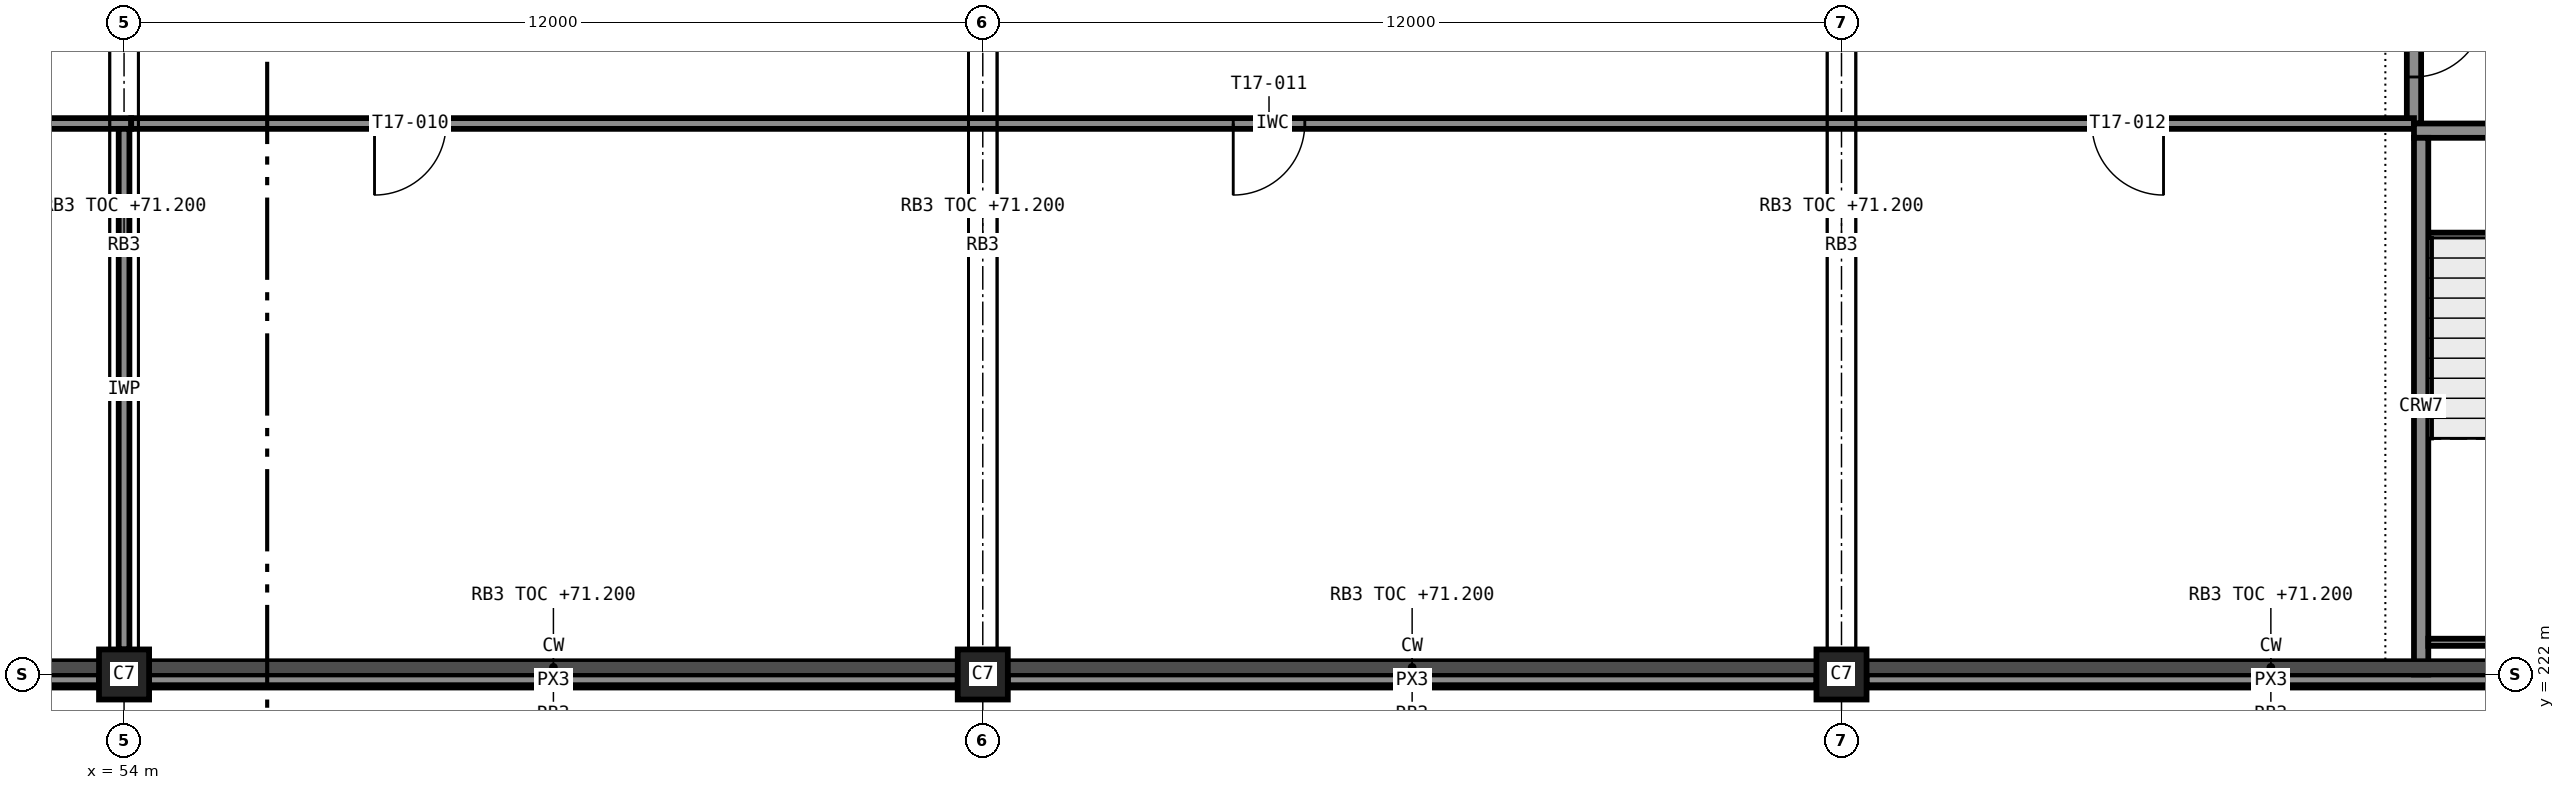
"""IFC4 building model, lengths in metres.
Left out: names, types, materials, properties, quantities, classifications, styles, units other than length and angle.
Written with IfcOpenShell. Run it as: python <this file> out.ifc"""

import sys

from ifc_helpers import new_model, si_unit, direction, frame, frame_2d, origin, origin_2d, place, context, subcontext, project, spatial, rectangle, extrude, element, fill, save


model = new_model("IFC4")
c1 = context("Model", 3, precision=1e-05, world=origin(), true_north=direction((0.0, 1.0)))
c2 = subcontext(c1, "Body", "Model", "MODEL_VIEW")
j1 = project(units=[si_unit("LENGTHUNIT", "METRE"), si_unit("PLANEANGLEUNIT", "RADIAN")], contexts=[c1])
p1 = place(None, origin())
s1 = spatial("IfcSite", under=j1, at=p1, CompositionType="ELEMENT")
p2 = place(p1, origin())
s2 = spatial("IfcBuilding", under=s1, at=p2, CompositionType="ELEMENT")
p3 = place(p2, frame((0.0, 0.0, 67.8)))
s3 = spatial("IfcBuildingStorey", under=s2, at=p3, CompositionType="ELEMENT", Elevation=67.8)
for number, where, z_axis, x_axis in (
    (1, (54.0, 222.0, 0.0), (0.0, 0.0, 1.0), (1.0, 0.0, 0.0)),
    (2, (66.0, 222.0, 0.0), (0.0, 0.0, 1.0), (1.0, 0.0, 0.0)),
    (3, (78.0, 222.0, 0.0), (0.0, 0.0, 1.0), (1.0, 0.0, 0.0)),
):
    element("IfcColumn", number, at=place(p3, frame(where, z_axis=z_axis, x_axis=x_axis)), inside=s3, PredefinedType="COLUMN", context=c2, shape_type="SweptSolid", body=[
        extrude(rectangle(XDim=0.7, YDim=0.7, at=origin_2d()), origin(), (0.0, 0.0, 1.0), 3.6),
    ])
p4 = place(p3, frame((89.5, 229.6, 0.0), z_axis=(0.0, 0.0, 1.0), x_axis=(-1.0, 0.0, 0.0)))
e4 = element("IfcWall", 4, at=p4, inside=s3, PredefinedType="SHEAR", context=c2, shape_type="SweptSolid", body=[
    extrude(rectangle(XDim=3.5, YDim=0.2, at=frame_2d((1.75, 0.0))), origin(), (0.0, 0.0, 1.0), 3.6),
])
p5 = place(p4, frame((1.15, 0.0, 0.0)))
e5 = element("IfcOpeningElement", 5, at=p5, cuts=e4, PredefinedType="OPENING", context=c2, shape_type="SweptSolid", body=[
    extrude(rectangle(XDim=1.2, YDim=2.1, at=frame_2d((0.6, 1.05))), frame((0.0, 0.11, 0.0), z_axis=(0.0, -1.0, 0.0), x_axis=(1.0, 0.0, 0.0)), (0.0, 0.0, 1.0), 0.22),
])
p6 = place(p3, frame((86.1, 222.0, 0.0), z_axis=(0.0, 0.0, 1.0), x_axis=(0.0, 1.0, 0.0)))
e6 = element("IfcWall", 6, at=p6, inside=s3, PredefinedType="SHEAR", context=c2, shape_type="SweptSolid", body=[
    extrude(rectangle(XDim=7.5, YDim=0.2, at=frame_2d((3.75, 0.0))), origin(), (0.0, 0.0, 1.0), 3.6),
])
p7 = place(p3, frame((89.5, 222.45, 0.0), z_axis=(0.0, 0.0, 1.0), x_axis=(-1.0, 0.0, 0.0)))
e7 = element("IfcWall", 7, at=p7, inside=s3, PredefinedType="SHEAR", context=c2, shape_type="SweptSolid", body=[
    extrude(rectangle(XDim=3.3, YDim=0.1, at=frame_2d((1.65, 0.0))), origin(), (0.0, 0.0, 1.0), 3.4),
])
for number, where, z_axis, x_axis in (
    (8, (42.35, 221.925, 3.4), (0.0, 0.0, 1.0), (1.0, 0.0, 0.0)),
    (9, (54.35, 221.925, 3.4), (0.0, 0.0, 1.0), (1.0, 0.0, 0.0)),
    (10, (66.35, 221.925, 3.4), (0.0, 0.0, 1.0), (1.0, 0.0, 0.0)),
    (11, (78.35, 221.925, 3.4), (0.0, 0.0, 1.0), (1.0, 0.0, 0.0)),
):
    element("IfcWall", number, at=place(p3, frame(where, z_axis=z_axis, x_axis=x_axis)), inside=s3, PredefinedType="STANDARD", context=c2, shape_type="SweptSolid", body=[
        extrude(rectangle(XDim=11.3, YDim=0.15, at=frame_2d((5.65, 0.0))), origin(), (0.0, 0.0, 1.0), 0.2),
    ])
p8 = place(p3, frame((86.0, 232.0, 0.0), z_axis=(0.0, 0.0, 1.0), x_axis=(0.0, -1.0, 0.0)))
e12 = element("IfcWall", 12, at=p8, inside=s3, PredefinedType="PARTITIONING", context=c2, shape_type="SweptSolid", body=[
    extrude(rectangle(XDim=2.3, YDim=0.2, at=frame_2d((1.15, 0.0))), origin(), (0.0, 0.0, 1.0), 3.4),
])
p9 = place(p8, frame((0.65, 0.0, 0.0)))
e13 = element("IfcOpeningElement", 13, at=p9, cuts=e12, PredefinedType="OPENING", context=c2, shape_type="SweptSolid", body=[
    extrude(rectangle(XDim=1.0, YDim=2.1, at=frame_2d((0.5, 1.05))), frame((0.0, 0.11, 0.0), z_axis=(0.0, -1.0, 0.0), x_axis=(1.0, 0.0, 0.0)), (0.0, 0.0, 1.0), 0.22),
])
p10 = place(p3, frame((54.1, 229.7, 0.0), z_axis=(0.0, 0.0, 1.0), x_axis=(-1.0, 0.0, 0.0)))
e14 = element("IfcWall", 14, at=p10, inside=s3, PredefinedType="PARTITIONING", context=c2, shape_type="SweptSolid", body=[
    extrude(rectangle(XDim=11.9, YDim=0.15, at=frame_2d((5.95, 0.0))), origin(), (0.0, 0.0, 1.0), 3.4),
])
p11 = place(p10, frame((7.6, 0.0, 0.0)))
e15 = element("IfcOpeningElement", 15, at=p11, cuts=e14, PredefinedType="OPENING", context=c2, shape_type="SweptSolid", body=[
    extrude(rectangle(XDim=1.0, YDim=2.1, at=frame_2d((0.5, 1.05))), frame((0.0, 0.085, 0.0), z_axis=(0.0, -1.0, 0.0), x_axis=(1.0, 0.0, 0.0)), (0.0, 0.0, 1.0), 0.17),
])
p12 = place(p10, frame((2.6, 0.0, 0.0)))
e16 = element("IfcOpeningElement", 16, at=p12, cuts=e14, PredefinedType="OPENING", context=c2, shape_type="SweptSolid", body=[
    extrude(rectangle(XDim=1.0, YDim=2.1, at=frame_2d((0.5, 1.05))), frame((0.0, 0.085, 0.0), z_axis=(0.0, -1.0, 0.0), x_axis=(1.0, 0.0, 0.0)), (0.0, 0.0, 1.0), 0.17),
])
p13 = place(p3, frame((86.0, 229.7, 0.0), z_axis=(0.0, 0.0, 1.0), x_axis=(-1.0, 0.0, 0.0)))
e17 = element("IfcWall", 17, at=p13, inside=s3, PredefinedType="PARTITIONING", context=c2, shape_type="SweptSolid", body=[
    extrude(rectangle(XDim=31.9, YDim=0.15, at=frame_2d((15.95, 0.0))), origin(), (0.0, 0.0, 1.0), 3.4),
])
p14 = place(p13, frame((27.5, 0.0, 0.0)))
e18 = element("IfcOpeningElement", 18, at=p14, cuts=e17, PredefinedType="OPENING", context=c2, shape_type="SweptSolid", body=[
    extrude(rectangle(XDim=1.0, YDim=2.1, at=frame_2d((0.5, 1.05))), frame((0.0, 0.085, 0.0), z_axis=(0.0, -1.0, 0.0), x_axis=(1.0, 0.0, 0.0)), (0.0, 0.0, 1.0), 0.17),
])
p15 = place(p13, frame((15.5, 0.0, 0.0)))
e19 = element("IfcOpeningElement", 19, at=p15, cuts=e17, PredefinedType="OPENING", context=c2, shape_type="SweptSolid", body=[
    extrude(rectangle(XDim=1.0, YDim=2.1, at=frame_2d((0.5, 1.05))), frame((0.0, 0.085, 0.0), z_axis=(0.0, -1.0, 0.0), x_axis=(1.0, 0.0, 0.0)), (0.0, 0.0, 1.0), 0.17),
])
p16 = place(p13, frame((3.5, 0.0, 0.0)))
e20 = element("IfcOpeningElement", 20, at=p16, cuts=e17, PredefinedType="OPENING", context=c2, shape_type="SweptSolid", body=[
    extrude(rectangle(XDim=1.0, YDim=2.1, at=frame_2d((0.5, 1.05))), frame((0.0, 0.085, 0.0), z_axis=(0.0, -1.0, 0.0), x_axis=(1.0, 0.0, 0.0)), (0.0, 0.0, 1.0), 0.17),
])
p17 = place(p3, frame((54.0, 222.35, 0.0), z_axis=(0.0, 0.0, 1.0), x_axis=(0.0, 1.0, 0.0)))
e21 = element("IfcWall", 21, at=p17, inside=s3, PredefinedType="PARTITIONING", context=c2, shape_type="SweptSolid", body=[
    extrude(rectangle(XDim=7.275, YDim=0.15, at=frame_2d((3.637, 0.0))), origin(), (0.0, 0.0, 1.0), 2.6),
])
p18 = place(p3, frame((86.2, 228.1, 3.6), z_axis=(0.0, 0.0, 1.0), x_axis=(1.0, 0.0, 0.0)))
e22 = element("IfcWall", 22, at=p18, inside=s3, PredefinedType="SOLIDWALL", context=c2, shape_type="SweptSolid", body=[
    extrude(rectangle(XDim=1.7, YDim=0.15, at=frame_2d((0.85, 0.0))), origin(), (0.0, 0.0, 1.0), 1.1),
])
p19 = place(p9, origin())
e23 = element("IfcDoor", 23, at=p19, inside=s3, OperationType="SINGLE_SWING_LEFT", PredefinedType="DOOR", context=c2, shape_type="SweptSolid", body=[
    extrude(rectangle(XDim=1.0, YDim=2.1, at=frame_2d((0.5, 1.05))), frame((0.0, 0.025, 0.0), z_axis=(0.0, -1.0, 0.0), x_axis=(1.0, 0.0, 0.0)), (0.0, 0.0, 1.0), 0.05),
])
fill(e13, e23)
p20 = place(p14, origin())
e24 = element("IfcDoor", 24, at=p20, inside=s3, OperationType="SINGLE_SWING_RIGHT", PredefinedType="DOOR", context=c2, shape_type="SweptSolid", body=[
    extrude(rectangle(XDim=1.0, YDim=2.1, at=frame_2d((0.5, 1.05))), frame((0.0, 0.025, 0.0), z_axis=(0.0, -1.0, 0.0), x_axis=(1.0, 0.0, 0.0)), (0.0, 0.0, 1.0), 0.05),
])
fill(e18, e24)
p21 = place(p15, origin())
e25 = element("IfcDoor", 25, at=p21, inside=s3, OperationType="SINGLE_SWING_RIGHT", PredefinedType="DOOR", context=c2, shape_type="SweptSolid", body=[
    extrude(rectangle(XDim=1.0, YDim=2.1, at=frame_2d((0.5, 1.05))), frame((0.0, 0.025, 0.0), z_axis=(0.0, -1.0, 0.0), x_axis=(1.0, 0.0, 0.0)), (0.0, 0.0, 1.0), 0.05),
])
fill(e19, e25)
p22 = place(p16, origin())
e26 = element("IfcDoor", 26, at=p22, inside=s3, OperationType="SINGLE_SWING_LEFT", PredefinedType="DOOR", context=c2, shape_type="SweptSolid", body=[
    extrude(rectangle(XDim=1.0, YDim=2.1, at=frame_2d((0.5, 1.05))), frame((0.0, 0.025, 0.0), z_axis=(0.0, -1.0, 0.0), x_axis=(1.0, 0.0, 0.0)), (0.0, 0.0, 1.0), 0.05),
])
fill(e20, e26)
save(model, sys.argv[1])
